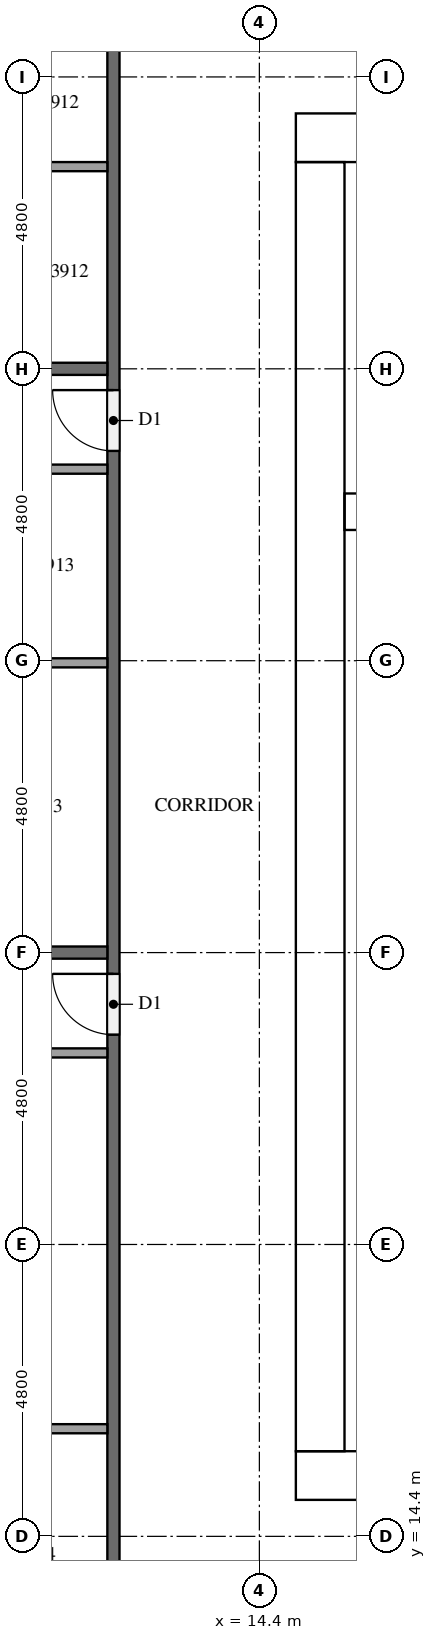
"""IFC4 building model, lengths in metres.
Left out: names, types, materials, properties, quantities, classifications, styles, units other than length and angle.
Written with IfcOpenShell. Run it as: python <this file> out.ifc"""

import sys

from ifc_helpers import new_model, si_unit, direction, frame, frame_2d, origin, place, context, subcontext, project, spatial, rectangle, extrude, element, fill, save


model = new_model("IFC4")
c1 = context("Model", 3, precision=1e-05, world=origin(), true_north=direction((0.0, 1.0)))
c2 = subcontext(c1, "Body", "Model", "MODEL_VIEW")
j1 = project(units=[si_unit("LENGTHUNIT", "METRE"), si_unit("PLANEANGLEUNIT", "RADIAN")], contexts=[c1])
p1 = place(None, origin())
s1 = spatial("IfcSite", under=j1, at=p1, CompositionType="ELEMENT")
p2 = place(p1, origin())
s2 = spatial("IfcBuilding", under=s1, at=p2, CompositionType="ELEMENT")
p3 = place(p2, frame((0.0, 0.0, 152.5)))
s3 = spatial("IfcBuildingStorey", under=s2, at=p3, CompositionType="ELEMENT", Elevation=152.5)
p4 = place(p3, frame((15.0, 15.4, 0.0), z_axis=(0.0, 0.0, 1.0), x_axis=(1.0, 0.0, 0.0)))
e1 = element("IfcWall", 1, at=p4, inside=s3, PredefinedType="SHEAR", context=c2, shape_type="SweptSolid", body=[
    extrude(rectangle(XDim=32.4, YDim=0.8, at=frame_2d((16.2, 0.0))), origin(), (0.0, 0.0, 1.0), 3.2),
])
p5 = place(p4, frame((15.3, 0.0, 0.0)))
e2 = element("IfcOpeningElement", 2, at=p5, cuts=e1, PredefinedType="OPENING", context=c2, shape_type="SweptSolid", body=[
    extrude(rectangle(XDim=1.8, YDim=2.1, at=frame_2d((0.9, 1.05))), frame((0.0, 0.41, 0.0), z_axis=(0.0, -1.0, 0.0), x_axis=(1.0, 0.0, 0.0)), (0.0, 0.0, 1.0), 0.82),
])
p6 = place(p3, frame((15.0, 37.4, 0.0), z_axis=(0.0, 0.0, 1.0), x_axis=(1.0, 0.0, 0.0)))
e3 = element("IfcWall", 3, at=p6, inside=s3, PredefinedType="SHEAR", context=c2, shape_type="SweptSolid", body=[
    extrude(rectangle(XDim=32.4, YDim=0.8, at=frame_2d((16.2, 0.0))), origin(), (0.0, 0.0, 1.0), 3.2),
])
p7 = place(p6, frame((15.3, 0.0, 0.0)))
e4 = element("IfcOpeningElement", 4, at=p7, cuts=e3, PredefinedType="OPENING", context=c2, shape_type="SweptSolid", body=[
    extrude(rectangle(XDim=1.8, YDim=2.1, at=frame_2d((0.9, 1.05))), frame((0.0, 0.41, 0.0), z_axis=(0.0, -1.0, 0.0), x_axis=(1.0, 0.0, 0.0)), (0.0, 0.0, 1.0), 0.82),
])
p8 = place(p6, frame((1.51, 0.0, 0.0)))
e5 = element("IfcOpeningElement", 5, at=p8, cuts=e3, PredefinedType="OPENING", context=c2, shape_type="SweptSolid", body=[
    extrude(rectangle(XDim=1.0, YDim=2.1, at=frame_2d((0.5, 1.05))), frame((0.0, 0.41, 0.0), z_axis=(0.0, -1.0, 0.0), x_axis=(1.0, 0.0, 0.0)), (0.0, 0.0, 1.0), 0.82),
])
p9 = place(p6, frame((5.11, 0.0, 0.0)))
e6 = element("IfcOpeningElement", 6, at=p9, cuts=e3, PredefinedType="OPENING", context=c2, shape_type="SweptSolid", body=[
    extrude(rectangle(XDim=1.0, YDim=2.1, at=frame_2d((0.5, 1.05))), frame((0.0, 0.41, 0.0), z_axis=(0.0, -1.0, 0.0), x_axis=(1.0, 0.0, 0.0)), (0.0, 0.0, 1.0), 0.82),
])
p10 = place(p3, frame((15.4, 15.8, 0.0), z_axis=(0.0, 0.0, 1.0), x_axis=(0.0, 1.0, 0.0)))
e7 = element("IfcWall", 7, at=p10, inside=s3, PredefinedType="SHEAR", context=c2, shape_type="SweptSolid", body=[
    extrude(rectangle(XDim=21.2, YDim=0.8, at=frame_2d((10.6, 0.0))), origin(), (0.0, 0.0, 1.0), 3.2),
])
p11 = place(p10, frame((4.96, 0.0, 0.0)))
e8 = element("IfcOpeningElement", 8, at=p11, cuts=e7, PredefinedType="OPENING", context=c2, shape_type="SweptSolid", body=[
    extrude(rectangle(XDim=1.2, YDim=2.1, at=frame_2d((0.6, 1.05))), frame((0.0, 0.41, 0.0), z_axis=(0.0, -1.0, 0.0), x_axis=(1.0, 0.0, 0.0)), (0.0, 0.0, 1.0), 0.82),
])
p12 = place(p3, frame((15.8, 31.25, 0.0), z_axis=(0.0, 0.0, 1.0), x_axis=(1.0, 0.0, 0.0)))
e9 = element("IfcWall", 9, at=p12, inside=s3, PredefinedType="SHEAR", context=c2, shape_type="SweptSolid", body=[
    extrude(rectangle(XDim=7.0, YDim=0.6, at=frame_2d((3.5, 0.0))), origin(), (0.0, 0.0, 1.0), 3.2),
])
p13 = place(p3, frame((12.0, 12.1, 0.0), z_axis=(0.0, 0.0, 1.0), x_axis=(0.0, 1.0, 0.0)))
e10 = element("IfcWall", 10, at=p13, inside=s3, PredefinedType="PARTITIONING", context=c2, shape_type="SweptSolid", body=[
    extrude(rectangle(XDim=28.6, YDim=0.2, at=frame_2d((14.3, 0.0))), origin(), (0.0, 0.0, 1.0), 3.2),
])
p14 = place(p13, frame((27.35, 0.0, 0.0)))
e11 = element("IfcOpeningElement", 11, at=p14, cuts=e10, PredefinedType="OPENING", context=c2, shape_type="SweptSolid", body=[
    extrude(rectangle(XDim=1.0, YDim=2.1, at=frame_2d((0.5, 1.05))), frame((0.0, 0.11, 0.0), z_axis=(0.0, -1.0, 0.0), x_axis=(1.0, 0.0, 0.0)), (0.0, 0.0, 1.0), 0.22),
])
p15 = place(p13, frame((20.15, 0.0, 0.0)))
e12 = element("IfcOpeningElement", 12, at=p15, cuts=e10, PredefinedType="OPENING", context=c2, shape_type="SweptSolid", body=[
    extrude(rectangle(XDim=1.0, YDim=2.1, at=frame_2d((0.5, 1.05))), frame((0.0, 0.11, 0.0), z_axis=(0.0, -1.0, 0.0), x_axis=(1.0, 0.0, 0.0)), (0.0, 0.0, 1.0), 0.22),
])
p16 = place(p13, frame((10.55, 0.0, 0.0)))
e13 = element("IfcOpeningElement", 13, at=p16, cuts=e10, PredefinedType="OPENING", context=c2, shape_type="SweptSolid", body=[
    extrude(rectangle(XDim=1.0, YDim=2.1, at=frame_2d((0.5, 1.05))), frame((0.0, 0.11, 0.0), z_axis=(0.0, -1.0, 0.0), x_axis=(1.0, 0.0, 0.0)), (0.0, 0.0, 1.0), 0.22),
])
for number, where, z_axis, x_axis in (
    (14, (0.375, 33.6, 0.0), (0.0, 0.0, 1.0), (1.0, 0.0, 0.0)),
    (15, (0.375, 24.0, 0.0), (0.0, 0.0, 1.0), (1.0, 0.0, 0.0)),
):
    element("IfcWall", number, at=place(p3, frame(where, z_axis=z_axis, x_axis=x_axis)), inside=s3, PredefinedType="PARTITIONING", context=c2, shape_type="SweptSolid", body=[
        extrude(rectangle(XDim=11.525, YDim=0.2, at=frame_2d((5.762, 0.0))), origin(), (0.0, 0.0, 1.0), 3.2),
    ])
p17 = place(p3, frame((11.9, 36.925, 0.0), z_axis=(0.0, 0.0, 1.0), x_axis=(-1.0, 0.0, 0.0)))
e16 = element("IfcWall", 16, at=p17, inside=s3, PredefinedType="PARTITIONING", context=c2, shape_type="SweptSolid", body=[
    extrude(rectangle(XDim=3.725, YDim=0.15, at=frame_2d((1.862, 0.0))), origin(), (0.0, 0.0, 1.0), 3.2),
])
p18 = place(p3, frame((11.9, 28.765, 0.0), z_axis=(0.0, 0.0, 1.0), x_axis=(-1.0, 0.0, 0.0)))
e17 = element("IfcWall", 17, at=p18, inside=s3, PredefinedType="PARTITIONING", context=c2, shape_type="SweptSolid", body=[
    extrude(rectangle(XDim=3.575, YDim=0.15, at=frame_2d((1.788, 0.0))), origin(), (0.0, 0.0, 1.0), 3.2),
])
p19 = place(p3, frame((11.9, 31.95, 0.0), z_axis=(0.0, 0.0, 1.0), x_axis=(-1.0, 0.0, 0.0)))
e18 = element("IfcWall", 18, at=p19, inside=s3, PredefinedType="PARTITIONING", context=c2, shape_type="SweptSolid", body=[
    extrude(rectangle(XDim=3.725, YDim=0.15, at=frame_2d((1.862, 0.0))), origin(), (0.0, 0.0, 1.0), 3.2),
])
p20 = place(p3, frame((11.9, 16.17, 0.0), z_axis=(0.0, 0.0, 1.0), x_axis=(-1.0, 0.0, 0.0)))
e19 = element("IfcWall", 19, at=p20, inside=s3, PredefinedType="PARTITIONING", context=c2, shape_type="SweptSolid", body=[
    extrude(rectangle(XDim=4.175, YDim=0.15, at=frame_2d((2.087, 0.0))), origin(), (0.0, 0.0, 1.0), 3.2),
])
p21 = place(p3, frame((11.9, 22.35, 0.0), z_axis=(0.0, 0.0, 1.0), x_axis=(-1.0, 0.0, 0.0)))
e20 = element("IfcWall", 20, at=p21, inside=s3, PredefinedType="PARTITIONING", context=c2, shape_type="SweptSolid", body=[
    extrude(rectangle(XDim=4.325, YDim=0.15, at=frame_2d((2.163, 0.0))), origin(), (0.0, 0.0, 1.0), 3.2),
])
p22 = place(p11, frame((1.2, 0.0, 0.0), z_axis=(0.0, 0.0, 1.0), x_axis=(-1.0, 0.0, 0.0)))
e21 = element("IfcDoor", 21, at=p22, inside=s3, OperationType="SINGLE_SWING_RIGHT", PredefinedType="DOOR", context=c2, shape_type="SweptSolid", body=[
    extrude(rectangle(XDim=1.2, YDim=2.1, at=frame_2d((0.6, 1.05))), frame((0.0, 0.025, 0.0), z_axis=(0.0, -1.0, 0.0), x_axis=(1.0, 0.0, 0.0)), (0.0, 0.0, 1.0), 0.05),
])
fill(e8, e21)
p23 = place(p15, origin())
e22 = element("IfcDoor", 22, at=p23, inside=s3, OperationType="SINGLE_SWING_RIGHT", PredefinedType="DOOR", context=c2, shape_type="SweptSolid", body=[
    extrude(rectangle(XDim=1.0, YDim=2.1, at=frame_2d((0.5, 1.05))), frame((0.0, 0.025, 0.0), z_axis=(0.0, -1.0, 0.0), x_axis=(1.0, 0.0, 0.0)), (0.0, 0.0, 1.0), 0.05),
])
fill(e12, e22)
p24 = place(p16, origin())
e23 = element("IfcDoor", 23, at=p24, inside=s3, OperationType="SINGLE_SWING_RIGHT", PredefinedType="DOOR", context=c2, shape_type="SweptSolid", body=[
    extrude(rectangle(XDim=1.0, YDim=2.1, at=frame_2d((0.5, 1.05))), frame((0.0, 0.025, 0.0), z_axis=(0.0, -1.0, 0.0), x_axis=(1.0, 0.0, 0.0)), (0.0, 0.0, 1.0), 0.05),
])
fill(e13, e23)
save(model, sys.argv[1])
